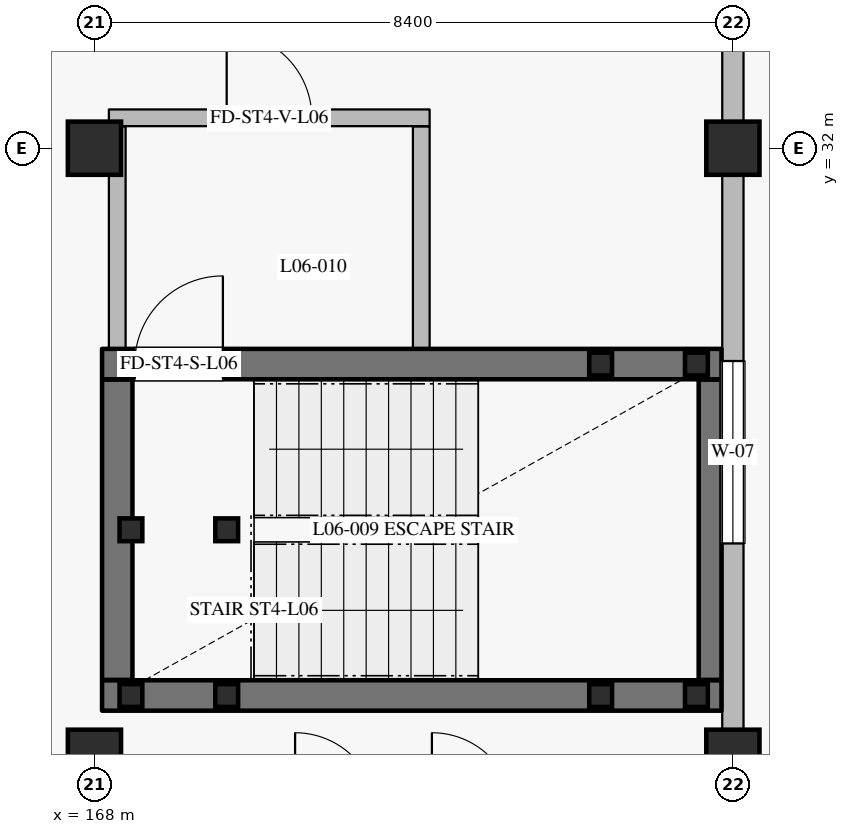
"""IFC4 building model, lengths in metres.
Left out: names, types, materials, properties, quantities, classifications, styles, units other than length and angle.
Written with IfcOpenShell. Run it as: python <this file> out.ifc"""

import sys

from ifc_helpers import new_model, si_unit, direction, frame, frame_2d, origin, origin_2d, place, context, subcontext, project, spatial, rectangle, hollow_rectangle, extrude, element, fill, save


model = new_model("IFC4")
c1 = context("Model", 3, precision=1e-05, world=origin(), true_north=direction((0.0, 1.0)))
c2 = subcontext(c1, "Body", "Model", "MODEL_VIEW")
j1 = project(units=[si_unit("LENGTHUNIT", "METRE"), si_unit("PLANEANGLEUNIT", "RADIAN")], contexts=[c1])
p1 = place(None, origin())
s1 = spatial("IfcSite", under=j1, at=p1, CompositionType="ELEMENT")
p2 = place(p1, origin())
s2 = spatial("IfcBuilding", under=s1, at=p2, CompositionType="ELEMENT")
p3 = place(p2, frame((0.0, 0.0, 28.8)))
s3 = spatial("IfcBuildingStorey", under=s2, at=p3, CompositionType="ELEMENT", Elevation=28.8)
for number, where, z_axis, x_axis in (
    (1, (168.0, 32.0, 0.0), (0.0, 0.0, 1.0), (1.0, 0.0, 0.0)),
    (2, (176.4, 32.0, 0.0), (0.0, 0.0, 1.0), (1.0, 0.0, 0.0)),
    (3, (168.0, 24.0, 0.0), (0.0, 0.0, 1.0), (1.0, 0.0, 0.0)),
    (4, (176.4, 24.0, 0.0), (0.0, 0.0, 1.0), (1.0, 0.0, 0.0)),
):
    element("IfcColumn", number, at=place(p3, frame(where, z_axis=z_axis, x_axis=x_axis)), inside=s3, PredefinedType="COLUMN", context=c2, shape_type="SweptSolid", body=[
        extrude(rectangle(XDim=0.7, YDim=0.7, at=origin_2d()), origin(), (0.0, 0.0, 1.0), 3.6),
    ])
p4 = place(p3, frame((176.4, 39.65, 0.0), z_axis=(0.0, 0.0, 1.0), x_axis=(0.0, -1.0, 0.0)))
e5 = element("IfcWall", 5, at=p4, inside=s3, PredefinedType="SOLIDWALL", context=c2, shape_type="SweptSolid", body=[
    extrude(rectangle(XDim=7.3, YDim=0.28, at=frame_2d((3.65, 0.0))), origin(), (0.0, 0.0, 1.0), 2.7),
])
p5 = place(p4, frame((2.85, 0.0, 0.0)))
e6 = element("IfcOpeningElement", 6, at=p5, cuts=e5, PredefinedType="OPENING", context=c2, shape_type="SweptSolid", body=[
    extrude(rectangle(XDim=1.6, YDim=2.25, at=frame_2d((0.8, 1.125))), frame((0.0, 0.15, 0.0), z_axis=(0.0, -1.0, 0.0), x_axis=(1.0, 0.0, 0.0)), (0.0, 0.0, 1.0), 0.3),
])
p6 = place(p3, frame((176.4, 31.65, 0.0), z_axis=(0.0, 0.0, 1.0), x_axis=(0.0, -1.0, 0.0)))
e7 = element("IfcWall", 7, at=p6, inside=s3, PredefinedType="SOLIDWALL", context=c2, shape_type="SweptSolid", body=[
    extrude(rectangle(XDim=7.3, YDim=0.28, at=frame_2d((3.65, 0.0))), origin(), (0.0, 0.0, 1.0), 2.7),
])
p7 = place(p6, frame((2.45, 0.0, 0.5)))
e8 = element("IfcOpeningElement", 8, at=p7, cuts=e7, PredefinedType="OPENING", context=c2, shape_type="SweptSolid", body=[
    extrude(rectangle(XDim=2.4, YDim=1.65, at=frame_2d((1.2, 0.825))), frame((0.0, 0.15, 0.0), z_axis=(0.0, -1.0, 0.0), x_axis=(1.0, 0.0, 0.0)), (0.0, 0.0, 1.0), 0.3),
])
p8 = place(p3, frame((168.1, 24.8, 0.0), z_axis=(0.0, 0.0, 1.0), x_axis=(1.0, 0.0, 0.0)))
e9 = element("IfcWall", 9, at=p8, inside=s3, PredefinedType="SHEAR", context=c2, shape_type="SweptSolid", body=[
    extrude(rectangle(XDim=8.15, YDim=0.4, at=frame_2d((4.075, 0.0))), origin(), (0.0, 0.0, 1.0), 3.365),
])
p9 = place(p3, frame((176.1, 25.005, 0.0), z_axis=(0.0, 0.0, 1.0), x_axis=(0.0, 1.0, 0.0)))
e10 = element("IfcWall", 10, at=p9, inside=s3, PredefinedType="SHEAR", context=c2, shape_type="SweptSolid", body=[
    extrude(rectangle(XDim=3.95, YDim=0.3, at=frame_2d((1.975, 0.0))), origin(), (0.0, 0.0, 1.0), 3.365),
])
p10 = place(p3, frame((168.1, 29.16, 0.0), z_axis=(0.0, 0.0, 1.0), x_axis=(1.0, 0.0, 0.0)))
e11 = element("IfcWall", 11, at=p10, inside=s3, PredefinedType="SHEAR", context=c2, shape_type="SweptSolid", body=[
    extrude(rectangle(XDim=8.15, YDim=0.4, at=frame_2d((4.075, 0.0))), origin(), (0.0, 0.0, 1.0), 3.365),
])
p11 = place(p10, frame((0.43, 0.0, 0.0)))
e12 = element("IfcOpeningElement", 12, at=p11, cuts=e11, PredefinedType="OPENING", context=c2, shape_type="SweptSolid", body=[
    extrude(rectangle(XDim=1.16, YDim=2.2, at=frame_2d((0.58, 1.1))), frame((0.0, 0.21, 0.0), z_axis=(0.0, -1.0, 0.0), x_axis=(1.0, 0.0, 0.0)), (0.0, 0.0, 1.0), 0.42),
])
p12 = place(p3, frame((168.3, 25.005, 0.0), z_axis=(0.0, 0.0, 1.0), x_axis=(0.0, 1.0, 0.0)))
e13 = element("IfcWall", 13, at=p12, inside=s3, PredefinedType="SHEAR", context=c2, shape_type="SweptSolid", body=[
    extrude(rectangle(XDim=3.95, YDim=0.4, at=frame_2d((1.975, 0.0))), origin(), (0.0, 0.0, 1.0), 3.365),
])
p13 = place(p3, frame((168.3, 29.365, 0.0), z_axis=(0.0, 0.0, 1.0), x_axis=(0.0, 1.0, 0.0)))
e14 = element("IfcWall", 14, at=p13, inside=s3, PredefinedType="PARTITIONING", context=c2, shape_type="SweptSolid", body=[
    extrude(rectangle(XDim=2.92, YDim=0.22, at=frame_2d((1.46, 0.0))), origin(), (0.0, 0.0, 1.0), 3.365),
])
p14 = place(p3, frame((168.19, 32.4, 0.0), z_axis=(0.0, 0.0, 1.0), x_axis=(1.0, 0.0, 0.0)))
e15 = element("IfcWall", 15, at=p14, inside=s3, PredefinedType="PARTITIONING", context=c2, shape_type="SweptSolid", body=[
    extrude(rectangle(XDim=4.22, YDim=0.22, at=frame_2d((2.11, 0.0))), origin(), (0.0, 0.0, 1.0), 3.365),
])
p15 = place(p14, frame((1.55, 0.0, 0.0)))
e16 = element("IfcOpeningElement", 16, at=p15, cuts=e15, PredefinedType="OPENING", context=c2, shape_type="SweptSolid", body=[
    extrude(rectangle(XDim=1.12, YDim=2.2, at=frame_2d((0.56, 1.1))), frame((0.0, 0.12, 0.0), z_axis=(0.0, -1.0, 0.0), x_axis=(1.0, 0.0, 0.0)), (0.0, 0.0, 1.0), 0.24),
])
p16 = place(p3, frame((172.3, 29.365, 0.0), z_axis=(0.0, 0.0, 1.0), x_axis=(0.0, 1.0, 0.0)))
e17 = element("IfcWall", 17, at=p16, inside=s3, PredefinedType="PARTITIONING", context=c2, shape_type="SweptSolid", body=[
    extrude(rectangle(XDim=2.92, YDim=0.22, at=frame_2d((1.46, 0.0))), origin(), (0.0, 0.0, 1.0), 3.365),
])
for number, where, z_axis, x_axis in (
    (18, (168.48, 24.8, 0.0), (0.0, 0.0, 1.0), (1.0, 0.0, 0.0)),
    (19, (168.48, 26.98, 0.0), (0.0, 0.0, 1.0), (1.0, 0.0, 0.0)),
    (20, (169.74, 24.8, 0.0), (0.0, 0.0, 1.0), (1.0, 0.0, 0.0)),
    (21, (169.74, 26.98, 0.0), (0.0, 0.0, 1.0), (1.0, 0.0, 0.0)),
    (22, (174.66, 24.8, -1.8), (0.0, 0.0, 1.0), (1.0, 0.0, 0.0)),
    (23, (174.66, 29.16, -1.8), (0.0, 0.0, 1.0), (1.0, 0.0, 0.0)),
    (24, (175.92, 24.8, -1.8), (0.0, 0.0, 1.0), (1.0, 0.0, 0.0)),
    (25, (175.92, 29.16, -1.8), (0.0, 0.0, 1.0), (1.0, 0.0, 0.0)),
):
    element("IfcColumn", number, at=place(p3, frame(where, z_axis=z_axis, x_axis=x_axis)), inside=s3, PredefinedType="COLUMN", context=c2, shape_type="SweptSolid", body=[
        extrude(hollow_rectangle(XDim=0.3, YDim=0.3, WallThickness=0.012, at=origin_2d()), origin(), (0.0, 0.0, 1.0), 3.42),
    ])
p17 = place(p7, origin())
e26 = element("IfcWindow", 26, at=p17, inside=s3, PartitioningType="DOUBLE_PANEL_VERTICAL", PredefinedType="WINDOW", context=c2, shape_type="SweptSolid", body=[
    extrude(rectangle(XDim=2.4, YDim=1.65, at=frame_2d((1.2, 0.825))), frame((0.0, 0.03, 0.0), z_axis=(0.0, -1.0, 0.0), x_axis=(1.0, 0.0, 0.0)), (0.0, 0.0, 1.0), 0.06),
])
fill(e8, e26)
p18 = place(p11, origin())
e27 = element("IfcDoor", 27, at=p18, inside=s3, OperationType="SINGLE_SWING_RIGHT", PredefinedType="DOOR", context=c2, shape_type="SweptSolid", body=[
    extrude(rectangle(XDim=1.16, YDim=2.2, at=frame_2d((0.58, 1.1))), frame((0.0, 0.025, 0.0), z_axis=(0.0, -1.0, 0.0), x_axis=(1.0, 0.0, 0.0)), (0.0, 0.0, 1.0), 0.05),
])
fill(e12, e27)
p19 = place(p15, origin())
e28 = element("IfcDoor", 28, at=p19, inside=s3, OperationType="SINGLE_SWING_LEFT", PredefinedType="DOOR", context=c2, shape_type="SweptSolid", body=[
    extrude(rectangle(XDim=1.12, YDim=2.2, at=frame_2d((0.56, 1.1))), frame((0.0, 0.025, 0.0), z_axis=(0.0, -1.0, 0.0), x_axis=(1.0, 0.0, 0.0)), (0.0, 0.0, 1.0), 0.05),
])
fill(e16, e28)
save(model, sys.argv[1])
